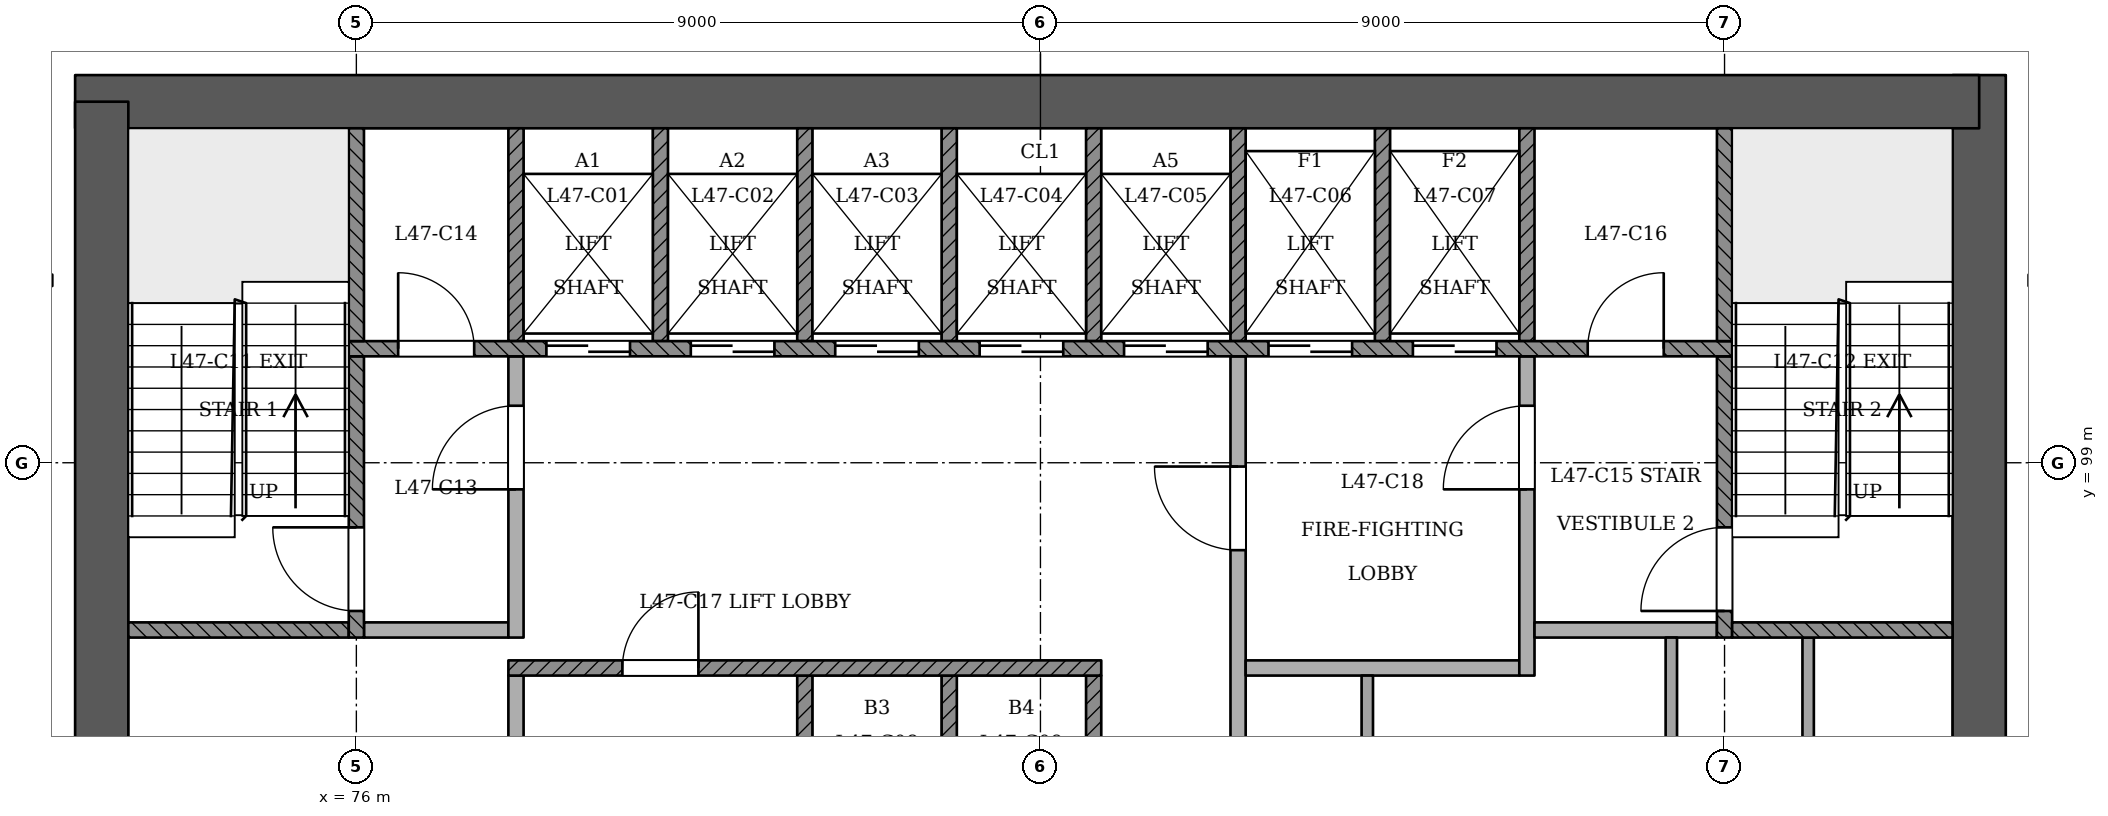
"""IFC4 building model, lengths in metres.
Left out: names, types, materials, properties, quantities, classifications, styles, units other than length and angle.
Written with IfcOpenShell. Run it as: python <this file> out.ifc"""

import sys

from ifc_helpers import new_model, si_unit, direction, frame, frame_2d, origin, place, context, subcontext, project, spatial, rectangle, extrude, element, fill, save


model = new_model("IFC4")
c1 = context("Model", 3, precision=1e-05, world=origin(), true_north=direction((0.0, 1.0)))
c2 = subcontext(c1, "Body", "Model", "MODEL_VIEW")
j1 = project(units=[si_unit("LENGTHUNIT", "METRE"), si_unit("PLANEANGLEUNIT", "RADIAN")], contexts=[c1])
p1 = place(None, origin())
s1 = spatial("IfcSite", under=j1, at=p1, CompositionType="ELEMENT")
p2 = place(p1, origin())
s2 = spatial("IfcBuilding", under=s1, at=p2, CompositionType="ELEMENT")
p3 = place(p2, frame((0.0, 0.0, 181.8)))
s3 = spatial("IfcBuildingStorey", under=s2, at=p3, CompositionType="ELEMENT", Elevation=181.8)
p4 = place(p3, frame((97.35, 93.05, 0.0), z_axis=(0.0, 0.0, 1.0), x_axis=(0.0, 1.0, 0.0)))
e1 = element("IfcWall", 1, at=p4, inside=s3, PredefinedType="SHEAR", context=c2, shape_type="SweptSolid", body=[
    extrude(rectangle(XDim=11.05, YDim=0.7, at=frame_2d((5.525, 0.0))), origin(), (0.0, 0.0, 1.0), 3.6),
])
p5 = place(p3, frame((97.35, 103.75, 0.0), z_axis=(0.0, 0.0, 1.0), x_axis=(-1.0, 0.0, 0.0)))
e2 = element("IfcWall", 2, at=p5, inside=s3, PredefinedType="SHEAR", context=c2, shape_type="SweptSolid", body=[
    extrude(rectangle(XDim=25.05, YDim=0.7, at=frame_2d((12.525, 0.0))), origin(), (0.0, 0.0, 1.0), 3.6),
])
p6 = place(p3, frame((72.65, 103.75, 0.0), z_axis=(0.0, 0.0, 1.0), x_axis=(0.0, -1.0, 0.0)))
e3 = element("IfcWall", 3, at=p6, inside=s3, PredefinedType="SHEAR", context=c2, shape_type="SweptSolid", body=[
    extrude(rectangle(XDim=11.05, YDim=0.7, at=frame_2d((5.525, 0.0))), origin(), (0.0, 0.0, 1.0), 3.6),
])
p7 = place(p3, frame((78.1, 93.4, 0.0), z_axis=(0.0, 0.0, 1.0), x_axis=(0.0, 1.0, 0.0)))
e4 = element("IfcWall", 4, at=p7, inside=s3, PredefinedType="PARTITIONING", context=c2, shape_type="SweptSolid", body=[
    extrude(rectangle(XDim=2.8, YDim=0.2, at=frame_2d((1.4, 0.0))), origin(), (0.0, 0.0, 1.0), 3.15),
])
for number, where, z_axis, x_axis in (
    (5, (81.9, 93.4, 0.0), (0.0, 0.0, 1.0), (0.0, 1.0, 0.0)),
    (6, (83.8, 93.4, 0.0), (0.0, 0.0, 1.0), (0.0, 1.0, 0.0)),
    (7, (85.7, 93.4, 0.0), (0.0, 0.0, 1.0), (0.0, 1.0, 0.0)),
):
    element("IfcWall", number, at=place(p3, frame(where, z_axis=z_axis, x_axis=x_axis)), inside=s3, PredefinedType="SOLIDWALL", context=c2, shape_type="SweptSolid", body=[
        extrude(rectangle(XDim=2.8, YDim=0.2, at=frame_2d((1.4, 0.0))), origin(), (0.0, 0.0, 1.0), 3.15),
    ])
p8 = place(p3, frame((87.6, 93.4, 0.0), z_axis=(0.0, 0.0, 1.0), x_axis=(0.0, 1.0, 0.0)))
e8 = element("IfcWall", 8, at=p8, inside=s3, PredefinedType="PARTITIONING", context=c2, shape_type="SweptSolid", body=[
    extrude(rectangle(XDim=7.0, YDim=0.2, at=frame_2d((3.5, 0.0))), origin(), (0.0, 0.0, 1.0), 3.15),
])
p9 = place(p8, frame((4.45, 0.0, 0.0)))
e9 = element("IfcOpeningElement", 9, at=p9, cuts=e8, PredefinedType="OPENING", context=c2, shape_type="SweptSolid", body=[
    extrude(rectangle(XDim=1.1, YDim=2.1, at=frame_2d((0.55, 1.05))), frame((0.0, 0.11, 0.0), z_axis=(0.0, -1.0, 0.0), x_axis=(1.0, 0.0, 0.0)), (0.0, 0.0, 1.0), 0.221),
])
p10 = place(p3, frame((89.3, 93.4, 0.0), z_axis=(0.0, 0.0, 1.0), x_axis=(0.0, 1.0, 0.0)))
e10 = element("IfcWall", 10, at=p10, inside=s3, PredefinedType="PARTITIONING", context=c2, shape_type="SweptSolid", body=[
    extrude(rectangle(XDim=2.8, YDim=0.15, at=frame_2d((1.4, 0.0))), origin(), (0.0, 0.0, 1.0), 3.15),
])
for number, where, z_axis, x_axis in (
    (11, (93.3, 93.4, 0.0), (0.0, 0.0, 1.0), (0.0, 1.0, 0.0)),
    (12, (95.1, 93.4, 0.0), (0.0, 0.0, 1.0), (0.0, 1.0, 0.0)),
):
    element("IfcWall", number, at=place(p3, frame(where, z_axis=z_axis, x_axis=x_axis)), inside=s3, PredefinedType="PARTITIONING", context=c2, shape_type="SweptSolid", body=[
        extrude(rectangle(XDim=3.3, YDim=0.15, at=frame_2d((1.65, 0.0))), origin(), (0.0, 0.0, 1.0), 3.15),
    ])
p11 = place(p3, frame((78.0, 96.3, 0.0), z_axis=(0.0, 0.0, 1.0), x_axis=(1.0, 0.0, 0.0)))
e13 = element("IfcWall", 13, at=p11, inside=s3, PredefinedType="SOLIDWALL", context=c2, shape_type="SweptSolid", body=[
    extrude(rectangle(XDim=7.8, YDim=0.2, at=frame_2d((3.9, 0.0))), origin(), (0.0, 0.0, 1.0), 3.15),
])
p12 = place(p11, frame((1.5, 0.0, 0.0)))
e14 = element("IfcOpeningElement", 14, at=p12, cuts=e13, PredefinedType="OPENING", context=c2, shape_type="SweptSolid", body=[
    extrude(rectangle(XDim=1.0, YDim=2.1, at=frame_2d((0.5, 1.05))), frame((0.0, 0.11, 0.0), z_axis=(0.0, -1.0, 0.0), x_axis=(1.0, 0.0, 0.0)), (0.0, 0.0, 1.0), 0.221),
])
p13 = place(p3, frame((87.7, 96.3, 0.0), z_axis=(0.0, 0.0, 1.0), x_axis=(1.0, 0.0, 0.0)))
e15 = element("IfcWall", 15, at=p13, inside=s3, PredefinedType="PARTITIONING", context=c2, shape_type="SweptSolid", body=[
    extrude(rectangle(XDim=3.6, YDim=0.2, at=frame_2d((1.8, 0.0))), origin(), (0.0, 0.0, 1.0), 3.15),
])
p14 = place(p3, frame((91.4, 96.2, 0.0), z_axis=(0.0, 0.0, 1.0), x_axis=(0.0, 1.0, 0.0)))
e16 = element("IfcWall", 16, at=p14, inside=s3, PredefinedType="PARTITIONING", context=c2, shape_type="SweptSolid", body=[
    extrude(rectangle(XDim=4.2, YDim=0.2, at=frame_2d((2.1, 0.0))), origin(), (0.0, 0.0, 1.0), 3.15),
])
p15 = place(p14, frame((2.45, 0.0, 0.0)))
e17 = element("IfcOpeningElement", 17, at=p15, cuts=e16, PredefinedType="OPENING", context=c2, shape_type="SweptSolid", body=[
    extrude(rectangle(XDim=1.1, YDim=2.1, at=frame_2d((0.55, 1.05))), frame((0.0, 0.11, 0.0), z_axis=(0.0, -1.0, 0.0), x_axis=(1.0, 0.0, 0.0)), (0.0, 0.0, 1.0), 0.221),
])
p16 = place(p3, frame((73.0, 96.8, 0.0), z_axis=(0.0, 0.0, 1.0), x_axis=(1.0, 0.0, 0.0)))
e18 = element("IfcWall", 18, at=p16, inside=s3, PredefinedType="SOLIDWALL", context=c2, shape_type="SweptSolid", body=[
    extrude(rectangle(XDim=2.9, YDim=0.2, at=frame_2d((1.45, 0.0))), origin(), (0.0, 0.0, 1.0), 3.15),
])
p17 = place(p3, frame((76.0, 96.7, 0.0), z_axis=(0.0, 0.0, 1.0), x_axis=(0.0, 1.0, 0.0)))
e19 = element("IfcWall", 19, at=p17, inside=s3, PredefinedType="SOLIDWALL", context=c2, shape_type="SweptSolid", body=[
    extrude(rectangle(XDim=3.7, YDim=0.2, at=frame_2d((1.85, 0.0))), origin(), (0.0, 0.0, 1.0), 3.15),
])
p18 = place(p17, frame((0.35, 0.0, 0.0)))
e20 = element("IfcOpeningElement", 20, at=p18, cuts=e19, PredefinedType="OPENING", context=c2, shape_type="SweptSolid", body=[
    extrude(rectangle(XDim=1.1, YDim=2.1, at=frame_2d((0.55, 1.05))), frame((0.0, 0.11, 0.0), z_axis=(0.0, -1.0, 0.0), x_axis=(1.0, 0.0, 0.0)), (0.0, 0.0, 1.0), 0.221),
])
p19 = place(p3, frame((76.1, 96.8, 0.0), z_axis=(0.0, 0.0, 1.0), x_axis=(1.0, 0.0, 0.0)))
e21 = element("IfcWall", 21, at=p19, inside=s3, PredefinedType="PARTITIONING", context=c2, shape_type="SweptSolid", body=[
    extrude(rectangle(XDim=1.9, YDim=0.2, at=frame_2d((0.95, 0.0))), origin(), (0.0, 0.0, 1.0), 3.15),
])
p20 = place(p3, frame((78.1, 96.7, 0.0), z_axis=(0.0, 0.0, 1.0), x_axis=(0.0, 1.0, 0.0)))
e22 = element("IfcWall", 22, at=p20, inside=s3, PredefinedType="PARTITIONING", context=c2, shape_type="SweptSolid", body=[
    extrude(rectangle(XDim=3.7, YDim=0.2, at=frame_2d((1.85, 0.0))), origin(), (0.0, 0.0, 1.0), 3.15),
])
p21 = place(p20, frame((1.95, 0.0, 0.0)))
e23 = element("IfcOpeningElement", 23, at=p21, cuts=e22, PredefinedType="OPENING", context=c2, shape_type="SweptSolid", body=[
    extrude(rectangle(XDim=1.1, YDim=2.1, at=frame_2d((0.55, 1.05))), frame((0.0, 0.11, 0.0), z_axis=(0.0, -1.0, 0.0), x_axis=(1.0, 0.0, 0.0)), (0.0, 0.0, 1.0), 0.221),
])
p22 = place(p3, frame((91.5, 96.8, 0.0), z_axis=(0.0, 0.0, 1.0), x_axis=(1.0, 0.0, 0.0)))
e24 = element("IfcWall", 24, at=p22, inside=s3, PredefinedType="PARTITIONING", context=c2, shape_type="SweptSolid", body=[
    extrude(rectangle(XDim=2.4, YDim=0.2, at=frame_2d((1.2, 0.0))), origin(), (0.0, 0.0, 1.0), 3.15),
])
p23 = place(p3, frame((94.0, 96.7, 0.0), z_axis=(0.0, 0.0, 1.0), x_axis=(0.0, 1.0, 0.0)))
e25 = element("IfcWall", 25, at=p23, inside=s3, PredefinedType="SOLIDWALL", context=c2, shape_type="SweptSolid", body=[
    extrude(rectangle(XDim=3.7, YDim=0.2, at=frame_2d((1.85, 0.0))), origin(), (0.0, 0.0, 1.0), 3.15),
])
p24 = place(p23, frame((0.35, 0.0, 0.0)))
e26 = element("IfcOpeningElement", 26, at=p24, cuts=e25, PredefinedType="OPENING", context=c2, shape_type="SweptSolid", body=[
    extrude(rectangle(XDim=1.1, YDim=2.1, at=frame_2d((0.55, 1.05))), frame((0.0, 0.11, 0.0), z_axis=(0.0, -1.0, 0.0), x_axis=(1.0, 0.0, 0.0)), (0.0, 0.0, 1.0), 0.221),
])
p25 = place(p3, frame((94.1, 96.8, 0.0), z_axis=(0.0, 0.0, 1.0), x_axis=(1.0, 0.0, 0.0)))
e27 = element("IfcWall", 27, at=p25, inside=s3, PredefinedType="SOLIDWALL", context=c2, shape_type="SweptSolid", body=[
    extrude(rectangle(XDim=2.9, YDim=0.2, at=frame_2d((1.45, 0.0))), origin(), (0.0, 0.0, 1.0), 3.15),
])
p26 = place(p3, frame((75.9, 100.5, 0.0), z_axis=(0.0, 0.0, 1.0), x_axis=(1.0, 0.0, 0.0)))
e28 = element("IfcWall", 28, at=p26, inside=s3, PredefinedType="SOLIDWALL", context=c2, shape_type="SweptSolid", body=[
    extrude(rectangle(XDim=18.2, YDim=0.2, at=frame_2d((9.1, 0.0))), origin(), (0.0, 0.0, 1.0), 3.15),
])
p27 = place(p26, frame((2.6, 0.0, 0.0)))
e29 = element("IfcOpeningElement", 29, at=p27, cuts=e28, PredefinedType="OPENING", context=c2, shape_type="SweptSolid", body=[
    extrude(rectangle(XDim=1.1, YDim=2.1, at=frame_2d((0.55, 1.05))), frame((0.0, 0.11, 0.0), z_axis=(0.0, -1.0, 0.0), x_axis=(1.0, 0.0, 0.0)), (0.0, 0.0, 1.0), 0.221),
])
p28 = place(p26, frame((4.5, 0.0, 0.0)))
e30 = element("IfcOpeningElement", 30, at=p28, cuts=e28, PredefinedType="OPENING", context=c2, shape_type="SweptSolid", body=[
    extrude(rectangle(XDim=1.1, YDim=2.1, at=frame_2d((0.55, 1.05))), frame((0.0, 0.11, 0.0), z_axis=(0.0, -1.0, 0.0), x_axis=(1.0, 0.0, 0.0)), (0.0, 0.0, 1.0), 0.221),
])
p29 = place(p26, frame((6.4, 0.0, 0.0)))
e31 = element("IfcOpeningElement", 31, at=p29, cuts=e28, PredefinedType="OPENING", context=c2, shape_type="SweptSolid", body=[
    extrude(rectangle(XDim=1.1, YDim=2.1, at=frame_2d((0.55, 1.05))), frame((0.0, 0.11, 0.0), z_axis=(0.0, -1.0, 0.0), x_axis=(1.0, 0.0, 0.0)), (0.0, 0.0, 1.0), 0.221),
])
p30 = place(p26, frame((8.3, 0.0, 0.0)))
e32 = element("IfcOpeningElement", 32, at=p30, cuts=e28, PredefinedType="OPENING", context=c2, shape_type="SweptSolid", body=[
    extrude(rectangle(XDim=1.1, YDim=2.1, at=frame_2d((0.55, 1.05))), frame((0.0, 0.11, 0.0), z_axis=(0.0, -1.0, 0.0), x_axis=(1.0, 0.0, 0.0)), (0.0, 0.0, 1.0), 0.221),
])
p31 = place(p26, frame((10.2, 0.0, 0.0)))
e33 = element("IfcOpeningElement", 33, at=p31, cuts=e28, PredefinedType="OPENING", context=c2, shape_type="SweptSolid", body=[
    extrude(rectangle(XDim=1.1, YDim=2.1, at=frame_2d((0.55, 1.05))), frame((0.0, 0.11, 0.0), z_axis=(0.0, -1.0, 0.0), x_axis=(1.0, 0.0, 0.0)), (0.0, 0.0, 1.0), 0.221),
])
p32 = place(p26, frame((12.1, 0.0, 0.0)))
e34 = element("IfcOpeningElement", 34, at=p32, cuts=e28, PredefinedType="OPENING", context=c2, shape_type="SweptSolid", body=[
    extrude(rectangle(XDim=1.1, YDim=2.1, at=frame_2d((0.55, 1.05))), frame((0.0, 0.11, 0.0), z_axis=(0.0, -1.0, 0.0), x_axis=(1.0, 0.0, 0.0)), (0.0, 0.0, 1.0), 0.221),
])
p33 = place(p26, frame((14.0, 0.0, 0.0)))
e35 = element("IfcOpeningElement", 35, at=p33, cuts=e28, PredefinedType="OPENING", context=c2, shape_type="SweptSolid", body=[
    extrude(rectangle(XDim=1.1, YDim=2.1, at=frame_2d((0.55, 1.05))), frame((0.0, 0.11, 0.0), z_axis=(0.0, -1.0, 0.0), x_axis=(1.0, 0.0, 0.0)), (0.0, 0.0, 1.0), 0.221),
])
p34 = place(p26, frame((0.65, 0.0, 0.0)))
e36 = element("IfcOpeningElement", 36, at=p34, cuts=e28, PredefinedType="OPENING", context=c2, shape_type="SweptSolid", body=[
    extrude(rectangle(XDim=1.0, YDim=2.1, at=frame_2d((0.5, 1.05))), frame((0.0, 0.11, 0.0), z_axis=(0.0, -1.0, 0.0), x_axis=(1.0, 0.0, 0.0)), (0.0, 0.0, 1.0), 0.221),
])
p35 = place(p26, frame((16.3, 0.0, 0.0)))
e37 = element("IfcOpeningElement", 37, at=p35, cuts=e28, PredefinedType="OPENING", context=c2, shape_type="SweptSolid", body=[
    extrude(rectangle(XDim=1.0, YDim=2.1, at=frame_2d((0.5, 1.05))), frame((0.0, 0.11, 0.0), z_axis=(0.0, -1.0, 0.0), x_axis=(1.0, 0.0, 0.0)), (0.0, 0.0, 1.0), 0.221),
])
for number, where, z_axis, x_axis in (
    (38, (76.0, 100.6, 0.0), (0.0, 0.0, 1.0), (0.0, 1.0, 0.0)),
    (39, (78.1, 100.6, 0.0), (0.0, 0.0, 1.0), (0.0, 1.0, 0.0)),
    (40, (80.0, 100.6, 0.0), (0.0, 0.0, 1.0), (0.0, 1.0, 0.0)),
    (41, (81.9, 100.6, 0.0), (0.0, 0.0, 1.0), (0.0, 1.0, 0.0)),
    (42, (83.8, 100.6, 0.0), (0.0, 0.0, 1.0), (0.0, 1.0, 0.0)),
    (43, (85.7, 100.6, 0.0), (0.0, 0.0, 1.0), (0.0, 1.0, 0.0)),
    (44, (87.6, 100.6, 0.0), (0.0, 0.0, 1.0), (0.0, 1.0, 0.0)),
    (45, (89.5, 100.6, 0.0), (0.0, 0.0, 1.0), (0.0, 1.0, 0.0)),
    (46, (91.4, 100.6, 0.0), (0.0, 0.0, 1.0), (0.0, 1.0, 0.0)),
    (47, (94.0, 100.6, 0.0), (0.0, 0.0, 1.0), (0.0, 1.0, 0.0)),
):
    element("IfcWall", number, at=place(p3, frame(where, z_axis=z_axis, x_axis=x_axis)), inside=s3, PredefinedType="SOLIDWALL", context=c2, shape_type="SweptSolid", body=[
        extrude(rectangle(XDim=2.8, YDim=0.2, at=frame_2d((1.4, 0.0))), origin(), (0.0, 0.0, 1.0), 3.15),
    ])
p36 = place(p27, origin())
e48 = element("IfcDoor", 48, at=p36, inside=s3, OperationType="SLIDING_TO_RIGHT", PredefinedType="NOTDEFINED", context=c2, shape_type="SweptSolid", body=[
    extrude(rectangle(XDim=1.1, YDim=2.1, at=frame_2d((0.55, 1.05))), frame((0.0, 0.025, 0.0), z_axis=(0.0, -1.0, 0.0), x_axis=(1.0, 0.0, 0.0)), (0.0, 0.0, 1.0), 0.05),
])
fill(e29, e48)
p37 = place(p28, origin())
e49 = element("IfcDoor", 49, at=p37, inside=s3, OperationType="SLIDING_TO_LEFT", PredefinedType="NOTDEFINED", context=c2, shape_type="SweptSolid", body=[
    extrude(rectangle(XDim=1.1, YDim=2.1, at=frame_2d((0.55, 1.05))), frame((0.0, 0.025, 0.0), z_axis=(0.0, -1.0, 0.0), x_axis=(1.0, 0.0, 0.0)), (0.0, 0.0, 1.0), 0.05),
])
fill(e30, e49)
p38 = place(p29, origin())
e50 = element("IfcDoor", 50, at=p38, inside=s3, OperationType="SLIDING_TO_RIGHT", PredefinedType="NOTDEFINED", context=c2, shape_type="SweptSolid", body=[
    extrude(rectangle(XDim=1.1, YDim=2.1, at=frame_2d((0.55, 1.05))), frame((0.0, 0.025, 0.0), z_axis=(0.0, -1.0, 0.0), x_axis=(1.0, 0.0, 0.0)), (0.0, 0.0, 1.0), 0.05),
])
fill(e31, e50)
p39 = place(p30, origin())
e51 = element("IfcDoor", 51, at=p39, inside=s3, OperationType="SLIDING_TO_LEFT", PredefinedType="NOTDEFINED", context=c2, shape_type="SweptSolid", body=[
    extrude(rectangle(XDim=1.1, YDim=2.1, at=frame_2d((0.55, 1.05))), frame((0.0, 0.025, 0.0), z_axis=(0.0, -1.0, 0.0), x_axis=(1.0, 0.0, 0.0)), (0.0, 0.0, 1.0), 0.05),
])
fill(e32, e51)
p40 = place(p31, origin())
e52 = element("IfcDoor", 52, at=p40, inside=s3, OperationType="SLIDING_TO_RIGHT", PredefinedType="NOTDEFINED", context=c2, shape_type="SweptSolid", body=[
    extrude(rectangle(XDim=1.1, YDim=2.1, at=frame_2d((0.55, 1.05))), frame((0.0, 0.025, 0.0), z_axis=(0.0, -1.0, 0.0), x_axis=(1.0, 0.0, 0.0)), (0.0, 0.0, 1.0), 0.05),
])
fill(e33, e52)
p41 = place(p32, origin())
e53 = element("IfcDoor", 53, at=p41, inside=s3, OperationType="SLIDING_TO_RIGHT", PredefinedType="NOTDEFINED", context=c2, shape_type="SweptSolid", body=[
    extrude(rectangle(XDim=1.1, YDim=2.1, at=frame_2d((0.55, 1.05))), frame((0.0, 0.025, 0.0), z_axis=(0.0, -1.0, 0.0), x_axis=(1.0, 0.0, 0.0)), (0.0, 0.0, 1.0), 0.05),
])
fill(e34, e53)
p42 = place(p33, origin())
e54 = element("IfcDoor", 54, at=p42, inside=s3, OperationType="SLIDING_TO_LEFT", PredefinedType="NOTDEFINED", context=c2, shape_type="SweptSolid", body=[
    extrude(rectangle(XDim=1.1, YDim=2.1, at=frame_2d((0.55, 1.05))), frame((0.0, 0.025, 0.0), z_axis=(0.0, -1.0, 0.0), x_axis=(1.0, 0.0, 0.0)), (0.0, 0.0, 1.0), 0.05),
])
fill(e35, e54)
p43 = place(p18, origin())
e55 = element("IfcDoor", 55, at=p43, inside=s3, OperationType="SINGLE_SWING_RIGHT", PredefinedType="NOTDEFINED", context=c2, shape_type="SweptSolid", body=[
    extrude(rectangle(XDim=1.1, YDim=2.1, at=frame_2d((0.55, 1.05))), frame((0.0, 0.025, 0.0), z_axis=(0.0, -1.0, 0.0), x_axis=(1.0, 0.0, 0.0)), (0.0, 0.0, 1.0), 0.05),
])
fill(e20, e55)
p44 = place(p24, origin())
e56 = element("IfcDoor", 56, at=p44, inside=s3, OperationType="SINGLE_SWING_LEFT", PredefinedType="NOTDEFINED", context=c2, shape_type="SweptSolid", body=[
    extrude(rectangle(XDim=1.1, YDim=2.1, at=frame_2d((0.55, 1.05))), frame((0.0, 0.025, 0.0), z_axis=(0.0, -1.0, 0.0), x_axis=(1.0, 0.0, 0.0)), (0.0, 0.0, 1.0), 0.05),
])
fill(e26, e56)
p45 = place(p21, origin())
e57 = element("IfcDoor", 57, at=p45, inside=s3, OperationType="SINGLE_SWING_LEFT", PredefinedType="NOTDEFINED", context=c2, shape_type="SweptSolid", body=[
    extrude(rectangle(XDim=1.1, YDim=2.1, at=frame_2d((0.55, 1.05))), frame((0.0, 0.025, 0.0), z_axis=(0.0, -1.0, 0.0), x_axis=(1.0, 0.0, 0.0)), (0.0, 0.0, 1.0), 0.05),
])
fill(e23, e57)
p46 = place(p9, origin())
e58 = element("IfcDoor", 58, at=p46, inside=s3, OperationType="SINGLE_SWING_RIGHT", PredefinedType="NOTDEFINED", context=c2, shape_type="SweptSolid", body=[
    extrude(rectangle(XDim=1.1, YDim=2.1, at=frame_2d((0.55, 1.05))), frame((0.0, 0.025, 0.0), z_axis=(0.0, -1.0, 0.0), x_axis=(1.0, 0.0, 0.0)), (0.0, 0.0, 1.0), 0.05),
])
fill(e9, e58)
p47 = place(p15, origin())
e59 = element("IfcDoor", 59, at=p47, inside=s3, OperationType="SINGLE_SWING_LEFT", PredefinedType="NOTDEFINED", context=c2, shape_type="SweptSolid", body=[
    extrude(rectangle(XDim=1.1, YDim=2.1, at=frame_2d((0.55, 1.05))), frame((0.0, 0.025, 0.0), z_axis=(0.0, -1.0, 0.0), x_axis=(1.0, 0.0, 0.0)), (0.0, 0.0, 1.0), 0.05),
])
fill(e17, e59)
p48 = place(p34, origin())
e60 = element("IfcDoor", 60, at=p48, inside=s3, OperationType="SINGLE_SWING_LEFT", PredefinedType="NOTDEFINED", context=c2, shape_type="SweptSolid", body=[
    extrude(rectangle(XDim=1.0, YDim=2.1, at=frame_2d((0.5, 1.05))), frame((0.0, 0.025, 0.0), z_axis=(0.0, -1.0, 0.0), x_axis=(1.0, 0.0, 0.0)), (0.0, 0.0, 1.0), 0.05),
])
fill(e36, e60)
p49 = place(p35, origin())
e61 = element("IfcDoor", 61, at=p49, inside=s3, OperationType="SINGLE_SWING_RIGHT", PredefinedType="NOTDEFINED", context=c2, shape_type="SweptSolid", body=[
    extrude(rectangle(XDim=1.0, YDim=2.1, at=frame_2d((0.5, 1.05))), frame((0.0, 0.025, 0.0), z_axis=(0.0, -1.0, 0.0), x_axis=(1.0, 0.0, 0.0)), (0.0, 0.0, 1.0), 0.05),
])
fill(e37, e61)
p50 = place(p12, origin())
e62 = element("IfcDoor", 62, at=p50, inside=s3, OperationType="SINGLE_SWING_RIGHT", PredefinedType="NOTDEFINED", context=c2, shape_type="SweptSolid", body=[
    extrude(rectangle(XDim=1.0, YDim=2.1, at=frame_2d((0.5, 1.05))), frame((0.0, 0.025, 0.0), z_axis=(0.0, -1.0, 0.0), x_axis=(1.0, 0.0, 0.0)), (0.0, 0.0, 1.0), 0.05),
])
fill(e14, e62)
save(model, sys.argv[1])
